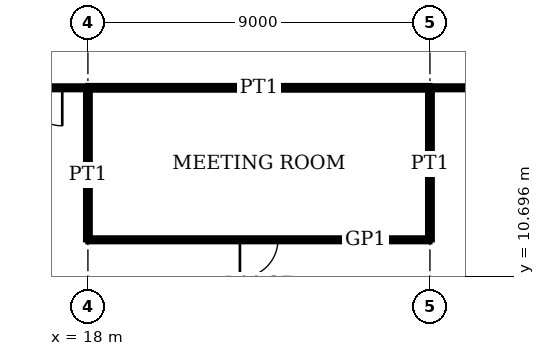
"""IFC4 building model, lengths in metres.
Left out: names, types, materials, properties, quantities, classifications, styles, units other than length and angle.
Written with IfcOpenShell. Run it as: python <this file> out.ifc"""

import sys

from ifc_helpers import new_model, si_unit, direction, frame, frame_2d, origin, place, context, subcontext, project, spatial, rectangle, extrude, element, fill, save


model = new_model("IFC4")
c1 = context("Model", 3, precision=1e-05, world=origin(), true_north=direction((0.0, 1.0)))
c2 = subcontext(c1, "Body", "Model", "MODEL_VIEW")
j1 = project(units=[si_unit("LENGTHUNIT", "METRE"), si_unit("PLANEANGLEUNIT", "RADIAN")], contexts=[c1])
p1 = place(None, origin())
s1 = spatial("IfcSite", under=j1, at=p1, CompositionType="ELEMENT")
p2 = place(p1, origin())
s2 = spatial("IfcBuilding", under=s1, at=p2, CompositionType="ELEMENT")
p3 = place(p2, frame((0.0, 0.0, 47.8)))
s3 = spatial("IfcBuildingStorey", under=s2, at=p3, CompositionType="ELEMENT", Elevation=47.8)
p4 = place(p3, frame((18.0, 11.65, 0.0), z_axis=(0.0, 0.0, 1.0), x_axis=(1.0, 0.0, 0.0)))
e1 = element("IfcWall", 1, at=p4, inside=s3, PredefinedType="PARTITIONING", context=c2, shape_type="SweptSolid", body=[
    extrude(rectangle(XDim=9.0, YDim=0.1, at=frame_2d((4.5, 0.0))), origin(), (0.0, 0.0, 1.0), 3.75),
])
p5 = place(p4, frame((4.0, 0.0, 0.0)))
e2 = element("IfcOpeningElement", 2, at=p5, cuts=e1, PredefinedType="OPENING", context=c2, shape_type="SweptSolid", body=[
    extrude(rectangle(XDim=1.0, YDim=2.4, at=frame_2d((0.5, 1.2))), frame((0.0, 0.06, 0.0), z_axis=(0.0, -1.0, 0.0), x_axis=(1.0, 0.0, 0.0)), (0.0, 0.0, 1.0), 0.12),
])
p6 = place(p3, frame((18.0, 15.65, 0.0), z_axis=(0.0, 0.0, 1.0), x_axis=(1.0, 0.0, 0.0)))
e3 = element("IfcWall", 3, at=p6, inside=s3, PredefinedType="PARTITIONING", context=c2, shape_type="SweptSolid", body=[
    extrude(rectangle(XDim=9.0, YDim=0.12, at=frame_2d((4.5, 0.0))), origin(), (0.0, 0.0, 1.0), 3.75),
])
p7 = place(p3, frame((15.65, 15.65, 0.0), z_axis=(0.0, 0.0, 1.0), x_axis=(1.0, 0.0, 0.0)))
e4 = element("IfcWall", 4, at=p7, inside=s3, PredefinedType="PARTITIONING", context=c2, shape_type="SweptSolid", body=[
    extrude(rectangle(XDim=2.35, YDim=0.1, at=frame_2d((1.175, 0.0))), origin(), (0.0, 0.0, 1.0), 3.75),
])
p8 = place(p7, frame((0.675, 0.0, 0.0)))
e5 = element("IfcOpeningElement", 5, at=p8, cuts=e4, PredefinedType="OPENING", context=c2, shape_type="SweptSolid", body=[
    extrude(rectangle(XDim=1.0, YDim=2.4, at=frame_2d((0.5, 1.2))), frame((0.0, 0.06, 0.0), z_axis=(0.0, -1.0, 0.0), x_axis=(1.0, 0.0, 0.0)), (0.0, 0.0, 1.0), 0.12),
])
p9 = place(p3, frame((27.0, 15.65, 0.0), z_axis=(0.0, 0.0, 1.0), x_axis=(1.0, 0.0, 0.0)))
e6 = element("IfcWall", 6, at=p9, inside=s3, PredefinedType="PARTITIONING", context=c2, shape_type="SweptSolid", body=[
    extrude(rectangle(XDim=20.35, YDim=0.1, at=frame_2d((10.175, 0.0))), origin(), (0.0, 0.0, 1.0), 3.75),
])
for number, where, z_axis, x_axis in (
    (7, (18.0, 11.65, 0.0), (0.0, 0.0, 1.0), (0.0, 1.0, 0.0)),
    (8, (27.0, 11.65, 0.0), (0.0, 0.0, 1.0), (0.0, 1.0, 0.0)),
):
    element("IfcWall", number, at=place(p3, frame(where, z_axis=z_axis, x_axis=x_axis)), inside=s3, PredefinedType="PARTITIONING", context=c2, shape_type="SweptSolid", body=[
        extrude(rectangle(XDim=4.0, YDim=0.12, at=frame_2d((2.0, 0.0))), origin(), (0.0, 0.0, 1.0), 3.05),
    ])
p10 = place(p5, origin())
e9 = element("IfcDoor", 9, at=p10, inside=s3, OperationType="SINGLE_SWING_LEFT", PredefinedType="DOOR", context=c2, shape_type="SweptSolid", body=[
    extrude(rectangle(XDim=1.0, YDim=2.4, at=frame_2d((0.5, 1.2))), frame((0.0, 0.02, 0.0), z_axis=(0.0, -1.0, 0.0), x_axis=(1.0, 0.0, 0.0)), (0.0, 0.0, 1.0), 0.04),
])
fill(e2, e9)
p11 = place(p8, origin())
e10 = element("IfcDoor", 10, at=p11, inside=s3, OperationType="SINGLE_SWING_RIGHT", PredefinedType="DOOR", context=c2, shape_type="SweptSolid", body=[
    extrude(rectangle(XDim=1.0, YDim=2.4, at=frame_2d((0.5, 1.2))), frame((0.0, 0.02, 0.0), z_axis=(0.0, -1.0, 0.0), x_axis=(1.0, 0.0, 0.0)), (0.0, 0.0, 1.0), 0.04),
])
fill(e5, e10)
save(model, sys.argv[1])
